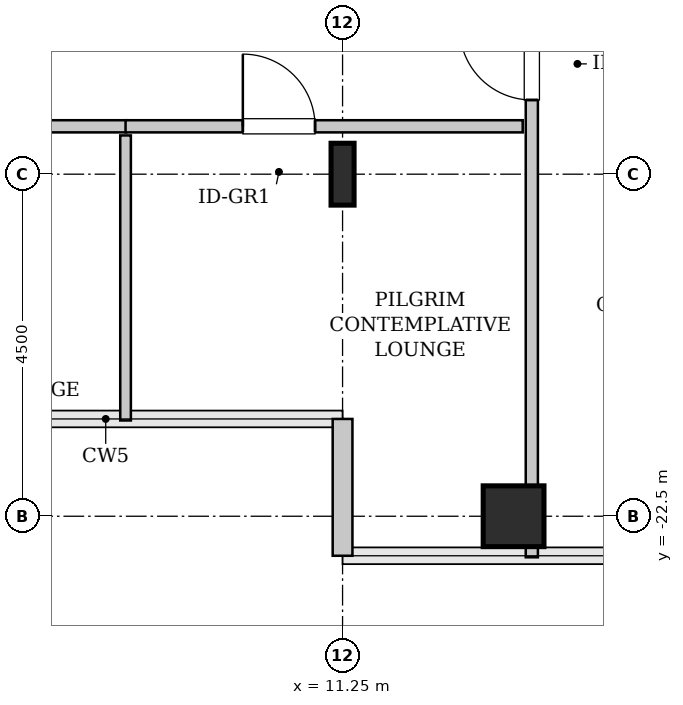
"""IFC4 building model, lengths in metres.
Left out: names, types, materials, properties, quantities, classifications, styles, units other than length and angle.
Written with IfcOpenShell. Run it as: python <this file> out.ifc"""

import sys

from ifc_helpers import new_model, si_unit, direction, frame, frame_2d, origin, origin_2d, place, context, subcontext, project, spatial, rectangle, hollow_rectangle, i_section, extrude, source, transform, mapped, element, fill, save


model = new_model("IFC4")
c1 = context("Model", 3, precision=1e-05, world=origin(), true_north=direction((0.0, 1.0)))
c2 = subcontext(c1, "Body", "Model", "MODEL_VIEW")
j1 = project(units=[si_unit("LENGTHUNIT", "METRE"), si_unit("PLANEANGLEUNIT", "RADIAN")], contexts=[c1])
p1 = place(None, origin())
s1 = spatial("IfcSite", under=j1, at=p1, CompositionType="ELEMENT")
p2 = place(p1, origin())
s2 = spatial("IfcBuilding", under=s1, at=p2, CompositionType="ELEMENT")
p3 = place(p2, frame((0.0, 0.0, 156.4)))
s3 = spatial("IfcBuildingStorey", under=s2, at=p3, CompositionType="ELEMENT", Elevation=156.4)
m1 = source(origin(), c2, "Body", "SweptSolid", [
    extrude(i_section(OverallWidth=0.303, OverallDepth=0.814, WebThickness=0.021, FlangeThickness=0.04, FilletRadius=0.03, at=origin_2d()), origin(), (0.0, 0.0, 1.0), 3.8),
])
p4 = place(p3, frame((11.25, -18.0, 0.0), z_axis=(0.0, 0.0, 1.0), x_axis=(1.0, 0.0, 0.0)))
e1 = element("IfcColumn", 1, at=p4, inside=s3, PredefinedType="COLUMN", context=c2, shape_type="MappedRepresentation", body=[
    mapped(m1, transform((0.0, 0.0, 0.0), x_axis=(1.0, 0.0, 0.0), y_axis=(0.0, 1.0, 0.0), z_axis=(0.0, 0.0, 1.0), scale=1.0)),
])
m2 = source(origin(), c2, "Body", "SweptSolid", [
    extrude(hollow_rectangle(XDim=0.8, YDim=0.8, WallThickness=0.04, InnerFilletRadius=0.04, OuterFilletRadius=0.08, at=origin_2d()), origin(), (0.0, 0.0, 1.0), 3.8),
])
p5 = place(p3, frame((13.5, -22.5, 0.0), z_axis=(0.0, 0.0, 1.0), x_axis=(1.0, 0.0, 0.0)))
e2 = element("IfcColumn", 2, at=p5, inside=s3, PredefinedType="COLUMN", context=c2, shape_type="MappedRepresentation", body=[
    mapped(m2, transform((0.0, 0.0, 0.0), x_axis=(1.0, 0.0, 0.0), y_axis=(0.0, 1.0, 0.0), z_axis=(0.0, 0.0, 1.0), scale=1.0)),
])
m3 = source(origin(), c2, "Body", "SweptSolid", [
    extrude(rectangle(XDim=1.8, YDim=0.26, at=frame_2d((0.9, 0.0))), origin(), (0.0, 0.0, 1.0), 3.55),
])
p6 = place(p3, frame((11.25, -21.22, 0.0), z_axis=(0.0, 0.0, 1.0), x_axis=(0.0, -1.0, 0.0)))
e3 = element("IfcWall", 3, at=p6, inside=s3, PredefinedType="SOLIDWALL", context=c2, shape_type="MappedRepresentation", body=[
    mapped(m3, transform((0.0, 0.0, 0.0), x_axis=(1.0, 0.0, 0.0), y_axis=(0.0, 1.0, 0.0), z_axis=(0.0, 0.0, 1.0), scale=1.0)),
])
m4 = source(origin(), c2, "Body", "SweptSolid", [
    extrude(rectangle(XDim=7.353, YDim=0.16, at=frame_2d((3.676, 0.0))), origin(), (0.0, 0.0, 1.0), 3.535),
])
p7 = place(p3, frame((13.74, -23.04, 0.0), z_axis=(0.0, 0.0, 1.0), x_axis=(0.0, 1.0, 0.0)))
e4 = element("IfcWall", 4, at=p7, inside=s3, PredefinedType="PARTITIONING", context=c2, shape_type="MappedRepresentation", body=[
    mapped(m4, transform((0.0, 0.0, 0.0), x_axis=(1.0, 0.0, 0.0), y_axis=(0.0, 1.0, 0.0), z_axis=(0.0, 0.0, 1.0), scale=1.0)),
])
p8 = place(p7, frame((6.016, 0.0, 0.0)))
e5 = element("IfcOpeningElement", 5, at=p8, cuts=e4, PredefinedType="OPENING", context=c2, shape_type="SweptSolid", body=[
    extrude(rectangle(XDim=0.95, YDim=2.1, at=frame_2d((0.475, 1.05))), frame((0.0, 0.09, 0.0), z_axis=(0.0, -1.0, 0.0), x_axis=(1.0, 0.0, 0.0)), (0.0, 0.0, 1.0), 0.18),
])
m5 = source(origin(), c2, "Body", "SweptSolid", [
    extrude(rectangle(XDim=5.81, YDim=0.16, at=frame_2d((2.905, 0.0))), origin(), (0.0, 0.0, 1.0), 3.535),
])
p9 = place(p3, frame((2.595, -17.37, 0.0), z_axis=(0.0, 0.0, 1.0), x_axis=(1.0, 0.0, 0.0)))
e6 = element("IfcWall", 6, at=p9, inside=s3, PredefinedType="PARTITIONING", context=c2, shape_type="MappedRepresentation", body=[
    mapped(m5, transform((0.0, 0.0, 0.0), x_axis=(1.0, 0.0, 0.0), y_axis=(0.0, 1.0, 0.0), z_axis=(0.0, 0.0, 1.0), scale=1.0)),
])
p10 = place(p9, frame((2.43, 0.0, 0.0)))
e7 = element("IfcOpeningElement", 7, at=p10, cuts=e6, PredefinedType="OPENING", context=c2, shape_type="SweptSolid", body=[
    extrude(rectangle(XDim=0.95, YDim=2.1, at=frame_2d((0.475, 1.05))), frame((0.0, 0.09, 0.0), z_axis=(0.0, -1.0, 0.0), x_axis=(1.0, 0.0, 0.0)), (0.0, 0.0, 1.0), 0.18),
])
m6 = source(origin(), c2, "Body", "SweptSolid", [
    extrude(rectangle(XDim=3.75, YDim=0.14, at=frame_2d((1.875, 0.0))), origin(), (0.0, 0.0, 1.0), 3.535),
])
p11 = place(p3, frame((8.395, -21.24, 0.0), z_axis=(0.0, 0.0, 1.0), x_axis=(0.0, 1.0, 0.0)))
e8 = element("IfcWall", 8, at=p11, inside=s3, PredefinedType="PARTITIONING", context=c2, shape_type="MappedRepresentation", body=[
    mapped(m6, transform((0.0, 0.0, 0.0), x_axis=(1.0, 0.0, 0.0), y_axis=(0.0, 1.0, 0.0), z_axis=(0.0, 0.0, 1.0), scale=1.0)),
])
m7 = source(origin(), c2, "Body", "SweptSolid", [
    extrude(rectangle(XDim=5.225, YDim=0.16, at=frame_2d((2.613, 0.0))), origin(), (0.0, 0.0, 1.0), 3.535),
])
p12 = place(p3, frame((8.395, -17.37, 0.0), z_axis=(0.0, 0.0, 1.0), x_axis=(1.0, 0.0, 0.0)))
e9 = element("IfcWall", 9, at=p12, inside=s3, PredefinedType="PARTITIONING", context=c2, shape_type="MappedRepresentation", body=[
    mapped(m7, transform((0.0, 0.0, 0.0), x_axis=(1.0, 0.0, 0.0), y_axis=(0.0, 1.0, 0.0), z_axis=(0.0, 0.0, 1.0), scale=1.0)),
])
p13 = place(p12, frame((1.543, 0.0, 0.0)))
e10 = element("IfcOpeningElement", 10, at=p13, cuts=e9, PredefinedType="OPENING", context=c2, shape_type="SweptSolid", body=[
    extrude(rectangle(XDim=0.95, YDim=2.1, at=frame_2d((0.475, 1.05))), frame((0.0, 0.09, 0.0), z_axis=(0.0, -1.0, 0.0), x_axis=(1.0, 0.0, 0.0)), (0.0, 0.0, 1.0), 0.18),
])
m8 = source(origin(), c2, "Body", "SweptSolid", [
    extrude(rectangle(XDim=0.95, YDim=2.1, at=frame_2d((0.475, 1.05))), frame((0.0, 0.025, 0.0), z_axis=(0.0, -1.0, 0.0), x_axis=(1.0, 0.0, 0.0)), (0.0, 0.0, 1.0), 0.05),
])
p14 = place(p8, origin())
e11 = element("IfcDoor", 11, at=p14, inside=s3, OperationType="SINGLE_SWING_RIGHT", PredefinedType="DOOR", context=c2, shape_type="MappedRepresentation", body=[
    mapped(m8, transform((0.0, 0.0, 0.0), x_axis=(1.0, 0.0, 0.0), y_axis=(0.0, 1.0, 0.0), z_axis=(0.0, 0.0, 1.0), scale=1.0)),
])
fill(e5, e11)
p15 = place(p13, origin())
e12 = element("IfcDoor", 12, at=p15, inside=s3, OperationType="SINGLE_SWING_LEFT", PredefinedType="DOOR", context=c2, shape_type="MappedRepresentation", body=[
    mapped(m8, transform((0.0, 0.0, 0.0), x_axis=(1.0, 0.0, 0.0), y_axis=(0.0, 1.0, 0.0), z_axis=(0.0, 0.0, 1.0), scale=1.0)),
])
fill(e10, e12)
save(model, sys.argv[1])
